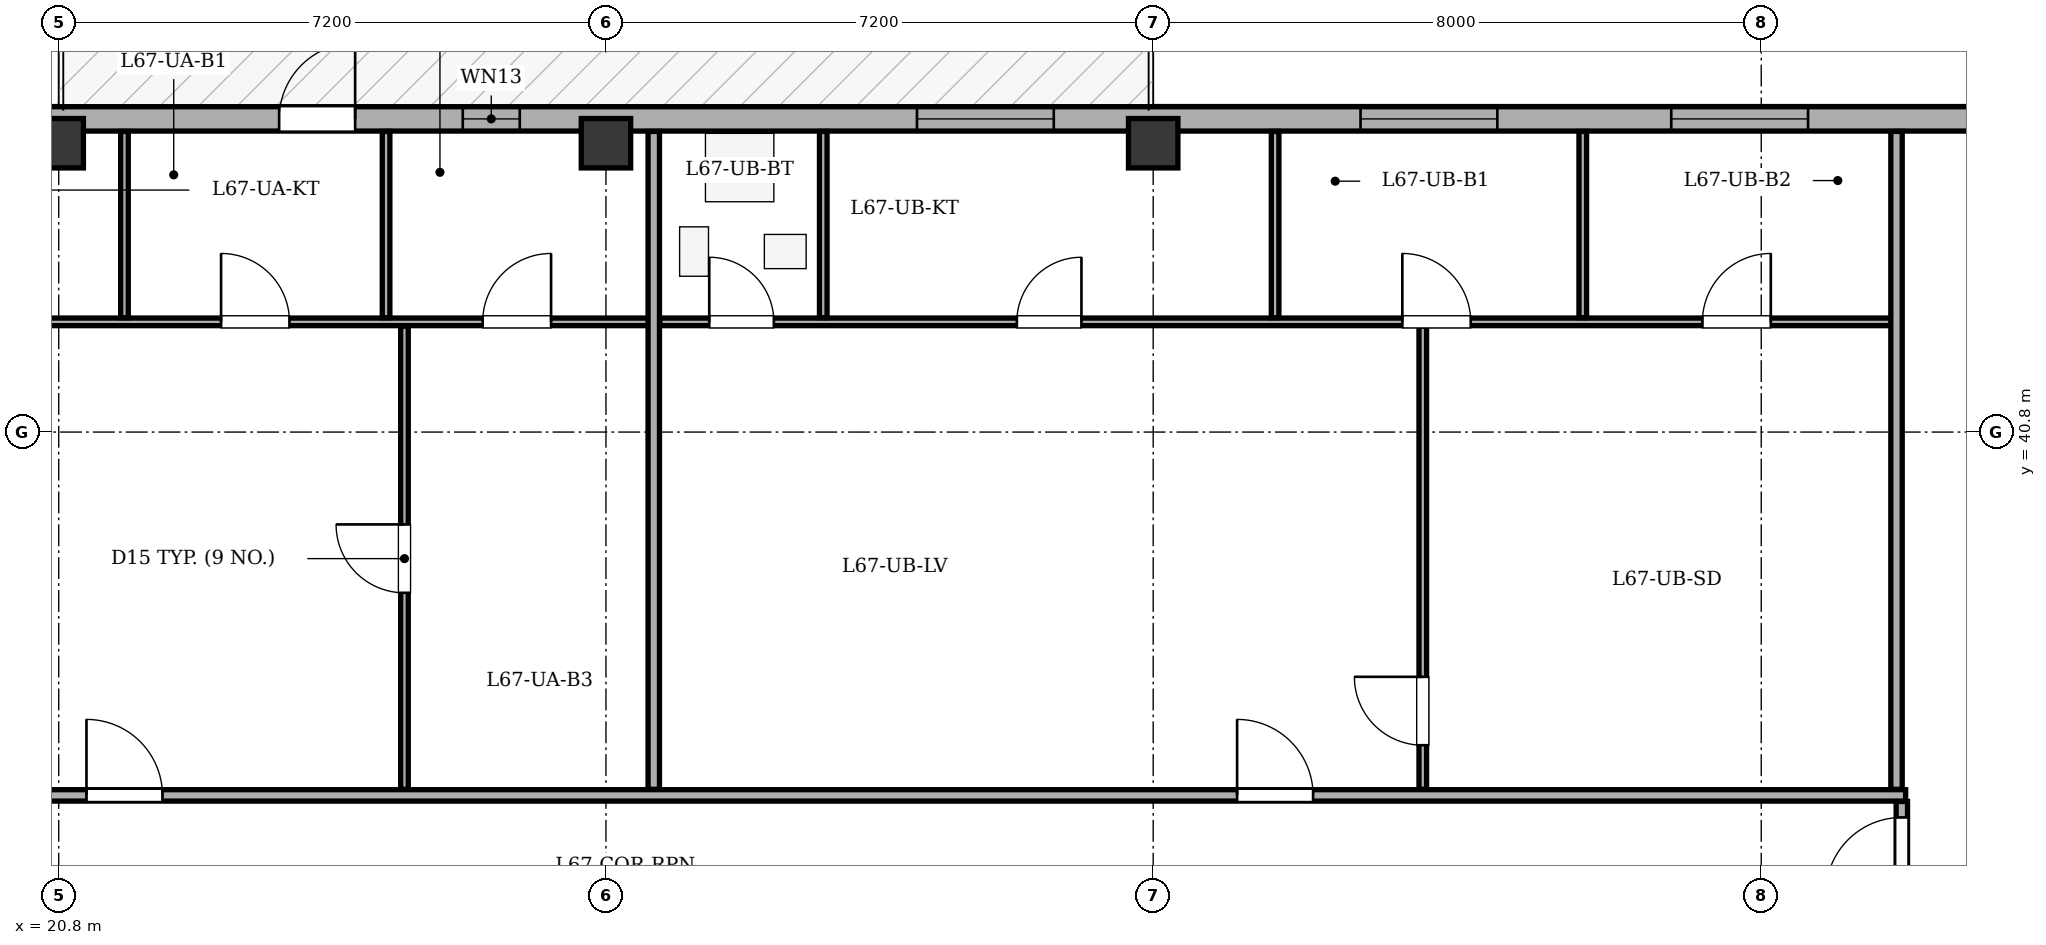
"""IFC4 building model, lengths in metres.
Left out: names, types, materials, properties, quantities, classifications, styles, units other than length and angle.
Written with IfcOpenShell. Run it as: python <this file> out.ifc"""

import sys

from ifc_helpers import new_model, si_unit, direction, frame, frame_2d, origin, origin_2d, place, context, subcontext, project, spatial, rectangle, extrude, element, fill, save


model = new_model("IFC4")
c1 = context("Model", 3, precision=1e-05, world=origin(), true_north=direction((0.0, 1.0)))
c2 = subcontext(c1, "Body", "Model", "MODEL_VIEW")
j1 = project(units=[si_unit("LENGTHUNIT", "METRE"), si_unit("PLANEANGLEUNIT", "RADIAN")], contexts=[c1])
p1 = place(None, origin())
s1 = spatial("IfcSite", under=j1, at=p1, CompositionType="ELEMENT")
p2 = place(p1, origin())
s2 = spatial("IfcBuilding", under=s1, at=p2, CompositionType="ELEMENT")
p3 = place(p2, frame((0.0, 0.0, 255.1)))
s3 = spatial("IfcBuildingStorey", under=s2, at=p3, CompositionType="ELEMENT", Elevation=255.1)
for number, where, z_axis, x_axis in (
    (1, (20.8, 44.6, 0.0), (0.0, 0.0, 1.0), (1.0, 0.0, 0.0)),
    (2, (28.0, 44.6, 0.0), (0.0, 0.0, 1.0), (1.0, 0.0, 0.0)),
    (3, (35.2, 44.6, 0.0), (0.0, 0.0, 1.0), (1.0, 0.0, 0.0)),
):
    element("IfcColumn", number, at=place(p3, frame(where, z_axis=z_axis, x_axis=x_axis)), inside=s3, PredefinedType="COLUMN", context=c2, shape_type="SweptSolid", body=[
        extrude(rectangle(XDim=0.65, YDim=0.65, at=origin_2d()), origin(), (0.0, 0.0, 1.0), 3.4),
    ])
p4 = place(p3, frame((14.7, 44.92, 0.0), z_axis=(0.0, 0.0, 1.0), x_axis=(1.0, 0.0, 0.0)))
e4 = element("IfcWall", 4, at=p4, inside=s3, PredefinedType="STANDARD", context=c2, shape_type="SweptSolid", body=[
    extrude(rectangle(XDim=37.0, YDim=0.32, at=frame_2d((18.5, 0.0))), origin(), (0.0, 0.0, 1.0), 2.725),
])
p5 = place(p4, frame((9.0, 0.0, 0.0)))
e5 = element("IfcOpeningElement", 5, at=p5, cuts=e4, PredefinedType="OPENING", context=c2, shape_type="SweptSolid", body=[
    extrude(rectangle(XDim=1.0, YDim=2.02, at=frame_2d((0.5, 1.01))), frame((0.0, 0.17, 0.0), z_axis=(0.0, -1.0, 0.0), x_axis=(1.0, 0.0, 0.0)), (0.0, 0.0, 1.0), 0.34),
])
p6 = place(p4, frame((3.228, 0.0, 0.75)))
e6 = element("IfcOpeningElement", 6, at=p6, cuts=e4, PredefinedType="OPENING", context=c2, shape_type="SweptSolid", body=[
    extrude(rectangle(XDim=1.8, YDim=1.7, at=frame_2d((0.9, 0.85))), frame((0.0, 0.17, 0.0), z_axis=(0.0, -1.0, 0.0), x_axis=(1.0, 0.0, 0.0)), (0.0, 0.0, 1.0), 0.34),
])
p7 = place(p4, frame((17.392, 0.0, 0.75)))
e7 = element("IfcOpeningElement", 7, at=p7, cuts=e4, PredefinedType="OPENING", context=c2, shape_type="SweptSolid", body=[
    extrude(rectangle(XDim=1.8, YDim=1.7, at=frame_2d((0.9, 0.85))), frame((0.0, 0.17, 0.0), z_axis=(0.0, -1.0, 0.0), x_axis=(1.0, 0.0, 0.0)), (0.0, 0.0, 1.0), 0.34),
])
p8 = place(p4, frame((23.228, 0.0, 0.75)))
e8 = element("IfcOpeningElement", 8, at=p8, cuts=e4, PredefinedType="OPENING", context=c2, shape_type="SweptSolid", body=[
    extrude(rectangle(XDim=1.8, YDim=1.7, at=frame_2d((0.9, 0.85))), frame((0.0, 0.17, 0.0), z_axis=(0.0, -1.0, 0.0), x_axis=(1.0, 0.0, 0.0)), (0.0, 0.0, 1.0), 0.34),
])
p9 = place(p4, frame((27.316, 0.0, 0.75)))
e9 = element("IfcOpeningElement", 9, at=p9, cuts=e4, PredefinedType="OPENING", context=c2, shape_type="SweptSolid", body=[
    extrude(rectangle(XDim=1.8, YDim=1.7, at=frame_2d((0.9, 0.85))), frame((0.0, 0.17, 0.0), z_axis=(0.0, -1.0, 0.0), x_axis=(1.0, 0.0, 0.0)), (0.0, 0.0, 1.0), 0.34),
])
p10 = place(p4, frame((31.315, 0.0, 0.75)))
e10 = element("IfcOpeningElement", 10, at=p10, cuts=e4, PredefinedType="OPENING", context=c2, shape_type="SweptSolid", body=[
    extrude(rectangle(XDim=1.8, YDim=1.7, at=frame_2d((0.9, 0.85))), frame((0.0, 0.17, 0.0), z_axis=(0.0, -1.0, 0.0), x_axis=(1.0, 0.0, 0.0)), (0.0, 0.0, 1.0), 0.34),
])
p11 = place(p4, frame((33.965, 0.0, 0.75)))
e11 = element("IfcOpeningElement", 11, at=p11, cuts=e4, PredefinedType="OPENING", context=c2, shape_type="SweptSolid", body=[
    extrude(rectangle(XDim=1.8, YDim=1.7, at=frame_2d((0.9, 0.85))), frame((0.0, 0.17, 0.0), z_axis=(0.0, -1.0, 0.0), x_axis=(1.0, 0.0, 0.0)), (0.0, 0.0, 1.0), 0.34),
])
p12 = place(p4, frame((11.416, 0.0, 0.75)))
e12 = element("IfcOpeningElement", 12, at=p12, cuts=e4, PredefinedType="OPENING", context=c2, shape_type="SweptSolid", body=[
    extrude(rectangle(XDim=0.75, YDim=1.45, at=frame_2d((0.375, 0.725))), frame((0.0, 0.17, 0.0), z_axis=(0.0, -1.0, 0.0), x_axis=(1.0, 0.0, 0.0)), (0.0, 0.0, 1.0), 0.34),
])
p13 = place(p3, frame((14.58, 36.02, 0.0), z_axis=(0.0, 0.0, 1.0), x_axis=(1.0, 0.0, 0.0)))
e13 = element("IfcWall", 13, at=p13, inside=s3, PredefinedType="PARTITIONING", context=c2, shape_type="SweptSolid", body=[
    extrude(rectangle(XDim=30.52, YDim=0.15, at=frame_2d((15.26, 0.0))), origin(), (0.0, 0.0, 1.0), 3.1),
])
p14 = place(p13, frame((6.585, 0.0, 0.0)))
e14 = element("IfcOpeningElement", 14, at=p14, cuts=e13, PredefinedType="OPENING", context=c2, shape_type="SweptSolid", body=[
    extrude(rectangle(XDim=1.0, YDim=2.1, at=frame_2d((0.5, 1.05))), frame((0.0, 0.085, 0.0), z_axis=(0.0, -1.0, 0.0), x_axis=(1.0, 0.0, 0.0)), (0.0, 0.0, 1.0), 0.17),
])
p15 = place(p13, frame((21.724, 0.0, 0.0)))
e15 = element("IfcOpeningElement", 15, at=p15, cuts=e13, PredefinedType="OPENING", context=c2, shape_type="SweptSolid", body=[
    extrude(rectangle(XDim=1.0, YDim=2.1, at=frame_2d((0.5, 1.05))), frame((0.0, 0.085, 0.0), z_axis=(0.0, -1.0, 0.0), x_axis=(1.0, 0.0, 0.0)), (0.0, 0.0, 1.0), 0.17),
])
p16 = place(p3, frame((14.78, 42.25, 0.0), z_axis=(0.0, 0.0, 1.0), x_axis=(1.0, 0.0, 0.0)))
e16 = element("IfcWall", 16, at=p16, inside=s3, PredefinedType="PARTITIONING", context=c2, shape_type="SweptSolid", body=[
    extrude(rectangle(XDim=13.889, YDim=0.1, at=frame_2d((6.944, 0.0))), origin(), (0.0, 0.0, 1.0), 3.1),
])
p17 = place(p16, frame((0.65, 0.0, 0.0)))
e17 = element("IfcOpeningElement", 17, at=p17, cuts=e16, PredefinedType="OPENING", context=c2, shape_type="SweptSolid", body=[
    extrude(rectangle(XDim=0.85, YDim=2.05, at=frame_2d((0.425, 1.025))), frame((0.0, 0.06, 0.0), z_axis=(0.0, -1.0, 0.0), x_axis=(1.0, 0.0, 0.0)), (0.0, 0.0, 1.0), 0.12),
])
p18 = place(p16, frame((4.093, 0.0, 0.0)))
e18 = element("IfcOpeningElement", 18, at=p18, cuts=e16, PredefinedType="OPENING", context=c2, shape_type="SweptSolid", body=[
    extrude(rectangle(XDim=0.85, YDim=2.05, at=frame_2d((0.425, 1.025))), frame((0.0, 0.06, 0.0), z_axis=(0.0, -1.0, 0.0), x_axis=(1.0, 0.0, 0.0)), (0.0, 0.0, 1.0), 0.12),
])
p19 = place(p16, frame((8.156, 0.0, 0.0)))
e19 = element("IfcOpeningElement", 19, at=p19, cuts=e16, PredefinedType="OPENING", context=c2, shape_type="SweptSolid", body=[
    extrude(rectangle(XDim=0.9, YDim=2.05, at=frame_2d((0.45, 1.025))), frame((0.0, 0.06, 0.0), z_axis=(0.0, -1.0, 0.0), x_axis=(1.0, 0.0, 0.0)), (0.0, 0.0, 1.0), 0.12),
])
p20 = place(p16, frame((11.598, 0.0, 0.0)))
e20 = element("IfcOpeningElement", 20, at=p20, cuts=e16, PredefinedType="OPENING", context=c2, shape_type="SweptSolid", body=[
    extrude(rectangle(XDim=0.9, YDim=2.05, at=frame_2d((0.45, 1.025))), frame((0.0, 0.06, 0.0), z_axis=(0.0, -1.0, 0.0), x_axis=(1.0, 0.0, 0.0)), (0.0, 0.0, 1.0), 0.12),
])
p21 = place(p3, frame((25.349, 36.1, 0.0), z_axis=(0.0, 0.0, 1.0), x_axis=(0.0, 1.0, 0.0)))
e21 = element("IfcWall", 21, at=p21, inside=s3, PredefinedType="PARTITIONING", context=c2, shape_type="SweptSolid", body=[
    extrude(rectangle(XDim=6.095, YDim=0.1, at=frame_2d((3.047, 0.0))), origin(), (0.0, 0.0, 1.0), 3.1),
])
p22 = place(p21, frame((2.585, 0.0, 0.0)))
e22 = element("IfcOpeningElement", 22, at=p22, cuts=e21, PredefinedType="OPENING", context=c2, shape_type="SweptSolid", body=[
    extrude(rectangle(XDim=0.9, YDim=2.05, at=frame_2d((0.45, 1.025))), frame((0.0, 0.06, 0.0), z_axis=(0.0, -1.0, 0.0), x_axis=(1.0, 0.0, 0.0)), (0.0, 0.0, 1.0), 0.12),
])
for number, where, z_axis, x_axis in (
    (23, (21.665, 42.305, 0.0), (0.0, 0.0, 1.0), (0.0, 1.0, 0.0)),
    (24, (25.107, 42.305, 0.0), (0.0, 0.0, 1.0), (0.0, 1.0, 0.0)),
):
    element("IfcWall", number, at=place(p3, frame(where, z_axis=z_axis, x_axis=x_axis)), inside=s3, PredefinedType="PARTITIONING", context=c2, shape_type="SweptSolid", body=[
        extrude(rectangle(XDim=2.45, YDim=0.1, at=frame_2d((1.225, 0.0))), origin(), (0.0, 0.0, 1.0), 3.1),
    ])
p23 = place(p3, frame((28.629, 36.1, 0.0), z_axis=(0.0, 0.0, 1.0), x_axis=(0.0, 1.0, 0.0)))
e25 = element("IfcWall", 25, at=p23, inside=s3, PredefinedType="PARTITIONING", context=c2, shape_type="SweptSolid", body=[
    extrude(rectangle(XDim=8.655, YDim=0.15, at=frame_2d((4.327, 0.0))), origin(), (0.0, 0.0, 1.0), 3.1),
])
p24 = place(p3, frame((28.709, 42.25, 0.0), z_axis=(0.0, 0.0, 1.0), x_axis=(1.0, 0.0, 0.0)))
e26 = element("IfcWall", 26, at=p24, inside=s3, PredefinedType="PARTITIONING", context=c2, shape_type="SweptSolid", body=[
    extrude(rectangle(XDim=16.311, YDim=0.1, at=frame_2d((8.156, 0.0))), origin(), (0.0, 0.0, 1.0), 3.1),
])
p25 = place(p24, frame((0.65, 0.0, 0.0)))
e27 = element("IfcOpeningElement", 27, at=p25, cuts=e26, PredefinedType="OPENING", context=c2, shape_type="SweptSolid", body=[
    extrude(rectangle(XDim=0.85, YDim=2.05, at=frame_2d((0.425, 1.025))), frame((0.0, 0.06, 0.0), z_axis=(0.0, -1.0, 0.0), x_axis=(1.0, 0.0, 0.0)), (0.0, 0.0, 1.0), 0.12),
])
p26 = place(p24, frame((4.697, 0.0, 0.0)))
e28 = element("IfcOpeningElement", 28, at=p26, cuts=e26, PredefinedType="OPENING", context=c2, shape_type="SweptSolid", body=[
    extrude(rectangle(XDim=0.85, YDim=2.05, at=frame_2d((0.425, 1.025))), frame((0.0, 0.06, 0.0), z_axis=(0.0, -1.0, 0.0), x_axis=(1.0, 0.0, 0.0)), (0.0, 0.0, 1.0), 0.12),
])
p27 = place(p24, frame((9.769, 0.0, 0.0)))
e29 = element("IfcOpeningElement", 29, at=p27, cuts=e26, PredefinedType="OPENING", context=c2, shape_type="SweptSolid", body=[
    extrude(rectangle(XDim=0.9, YDim=2.05, at=frame_2d((0.45, 1.025))), frame((0.0, 0.06, 0.0), z_axis=(0.0, -1.0, 0.0), x_axis=(1.0, 0.0, 0.0)), (0.0, 0.0, 1.0), 0.12),
])
p28 = place(p24, frame((13.717, 0.0, 0.0)))
e30 = element("IfcOpeningElement", 30, at=p28, cuts=e26, PredefinedType="OPENING", context=c2, shape_type="SweptSolid", body=[
    extrude(rectangle(XDim=0.9, YDim=2.05, at=frame_2d((0.45, 1.025))), frame((0.0, 0.06, 0.0), z_axis=(0.0, -1.0, 0.0), x_axis=(1.0, 0.0, 0.0)), (0.0, 0.0, 1.0), 0.12),
])
p29 = place(p3, frame((38.747, 36.1, 0.0), z_axis=(0.0, 0.0, 1.0), x_axis=(0.0, 1.0, 0.0)))
e31 = element("IfcWall", 31, at=p29, inside=s3, PredefinedType="PARTITIONING", context=c2, shape_type="SweptSolid", body=[
    extrude(rectangle(XDim=6.095, YDim=0.1, at=frame_2d((3.047, 0.0))), origin(), (0.0, 0.0, 1.0), 3.1),
])
p30 = place(p29, frame((0.58, 0.0, 0.0)))
e32 = element("IfcOpeningElement", 32, at=p30, cuts=e31, PredefinedType="OPENING", context=c2, shape_type="SweptSolid", body=[
    extrude(rectangle(XDim=0.9, YDim=2.05, at=frame_2d((0.45, 1.025))), frame((0.0, 0.06, 0.0), z_axis=(0.0, -1.0, 0.0), x_axis=(1.0, 0.0, 0.0)), (0.0, 0.0, 1.0), 0.12),
])
for number, where, z_axis, x_axis in (
    (33, (30.859, 42.305, 0.0), (0.0, 0.0, 1.0), (0.0, 1.0, 0.0)),
    (34, (36.804, 42.305, 0.0), (0.0, 0.0, 1.0), (0.0, 1.0, 0.0)),
    (35, (40.852, 42.305, 0.0), (0.0, 0.0, 1.0), (0.0, 1.0, 0.0)),
):
    element("IfcWall", number, at=place(p3, frame(where, z_axis=z_axis, x_axis=x_axis)), inside=s3, PredefinedType="PARTITIONING", context=c2, shape_type="SweptSolid", body=[
        extrude(rectangle(XDim=2.45, YDim=0.1, at=frame_2d((1.225, 0.0))), origin(), (0.0, 0.0, 1.0), 3.1),
    ])
p31 = place(p3, frame((44.98, 36.1, 0.0), z_axis=(0.0, 0.0, 1.0), x_axis=(0.0, 1.0, 0.0)))
e36 = element("IfcWall", 36, at=p31, inside=s3, PredefinedType="PARTITIONING", context=c2, shape_type="SweptSolid", body=[
    extrude(rectangle(XDim=8.655, YDim=0.15, at=frame_2d((4.327, 0.0))), origin(), (0.0, 0.0, 1.0), 2.725),
])
p32 = place(p3, frame((45.05, 34.15, 0.0), z_axis=(0.0, 0.0, 1.0), x_axis=(0.0, 1.0, 0.0)))
e37 = element("IfcWall", 37, at=p32, inside=s3, PredefinedType="PARTITIONING", context=c2, shape_type="SweptSolid", body=[
    extrude(rectangle(XDim=1.79, YDim=0.15, at=frame_2d((0.895, 0.0))), origin(), (0.0, 0.0, 1.0), 2.725),
])
p33 = place(p32, frame((0.58, 0.0, 0.0)))
e38 = element("IfcOpeningElement", 38, at=p33, cuts=e37, PredefinedType="OPENING", context=c2, shape_type="SweptSolid", body=[
    extrude(rectangle(XDim=1.0, YDim=2.1, at=frame_2d((0.5, 1.05))), frame((0.0, 0.085, 0.0), z_axis=(0.0, -1.0, 0.0), x_axis=(1.0, 0.0, 0.0)), (0.0, 0.0, 1.0), 0.17),
])
p34 = place(p5, origin())
e39 = element("IfcDoor", 39, at=p34, inside=s3, OperationType="SINGLE_SWING_RIGHT", PredefinedType="DOOR", context=c2, shape_type="SweptSolid", body=[
    extrude(rectangle(XDim=1.0, YDim=2.02, at=frame_2d((0.5, 1.01))), frame((0.0, 0.025, 0.0), z_axis=(0.0, -1.0, 0.0), x_axis=(1.0, 0.0, 0.0)), (0.0, 0.0, 1.0), 0.05),
])
fill(e5, e39)
p35 = place(p7, origin())
e40 = element("IfcWindow", 40, at=p35, inside=s3, PartitioningType="SINGLE_PANEL", PredefinedType="WINDOW", context=c2, shape_type="SweptSolid", body=[
    extrude(rectangle(XDim=1.8, YDim=1.7, at=frame_2d((0.9, 0.85))), frame((0.0, -0.01, 0.0), z_axis=(0.0, -1.0, 0.0), x_axis=(1.0, 0.0, 0.0)), (0.0, 0.0, 1.0), 0.06),
])
fill(e7, e40)
p36 = place(p8, origin())
e41 = element("IfcWindow", 41, at=p36, inside=s3, PartitioningType="SINGLE_PANEL", PredefinedType="WINDOW", context=c2, shape_type="SweptSolid", body=[
    extrude(rectangle(XDim=1.8, YDim=1.7, at=frame_2d((0.9, 0.85))), frame((0.0, -0.01, 0.0), z_axis=(0.0, -1.0, 0.0), x_axis=(1.0, 0.0, 0.0)), (0.0, 0.0, 1.0), 0.06),
])
fill(e8, e41)
p37 = place(p9, origin())
e42 = element("IfcWindow", 42, at=p37, inside=s3, PartitioningType="SINGLE_PANEL", PredefinedType="WINDOW", context=c2, shape_type="SweptSolid", body=[
    extrude(rectangle(XDim=1.8, YDim=1.7, at=frame_2d((0.9, 0.85))), frame((0.0, -0.01, 0.0), z_axis=(0.0, -1.0, 0.0), x_axis=(1.0, 0.0, 0.0)), (0.0, 0.0, 1.0), 0.06),
])
fill(e9, e42)
p38 = place(p12, origin())
e43 = element("IfcWindow", 43, at=p38, inside=s3, PartitioningType="SINGLE_PANEL", PredefinedType="WINDOW", context=c2, shape_type="SweptSolid", body=[
    extrude(rectangle(XDim=0.75, YDim=1.45, at=frame_2d((0.375, 0.725))), frame((0.0, -0.01, 0.0), z_axis=(0.0, -1.0, 0.0), x_axis=(1.0, 0.0, 0.0)), (0.0, 0.0, 1.0), 0.06),
])
fill(e12, e43)
p39 = place(p14, origin())
e44 = element("IfcDoor", 44, at=p39, inside=s3, OperationType="SINGLE_SWING_LEFT", PredefinedType="DOOR", context=c2, shape_type="SweptSolid", body=[
    extrude(rectangle(XDim=1.0, YDim=2.1, at=frame_2d((0.5, 1.05))), frame((0.0, 0.025, 0.0), z_axis=(0.0, -1.0, 0.0), x_axis=(1.0, 0.0, 0.0)), (0.0, 0.0, 1.0), 0.05),
])
fill(e14, e44)
p40 = place(p15, origin())
e45 = element("IfcDoor", 45, at=p40, inside=s3, OperationType="SINGLE_SWING_LEFT", PredefinedType="DOOR", context=c2, shape_type="SweptSolid", body=[
    extrude(rectangle(XDim=1.0, YDim=2.1, at=frame_2d((0.5, 1.05))), frame((0.0, 0.025, 0.0), z_axis=(0.0, -1.0, 0.0), x_axis=(1.0, 0.0, 0.0)), (0.0, 0.0, 1.0), 0.05),
])
fill(e15, e45)
p41 = place(p22, origin())
e46 = element("IfcDoor", 46, at=p41, inside=s3, OperationType="SINGLE_SWING_RIGHT", PredefinedType="DOOR", context=c2, shape_type="SweptSolid", body=[
    extrude(rectangle(XDim=0.9, YDim=2.05, at=frame_2d((0.45, 1.025))), frame((0.0, 0.025, 0.0), z_axis=(0.0, -1.0, 0.0), x_axis=(1.0, 0.0, 0.0)), (0.0, 0.0, 1.0), 0.05),
])
fill(e22, e46)
p42 = place(p19, origin())
e47 = element("IfcDoor", 47, at=p42, inside=s3, OperationType="SINGLE_SWING_LEFT", PredefinedType="DOOR", context=c2, shape_type="SweptSolid", body=[
    extrude(rectangle(XDim=0.9, YDim=2.05, at=frame_2d((0.45, 1.025))), frame((0.0, 0.025, 0.0), z_axis=(0.0, -1.0, 0.0), x_axis=(1.0, 0.0, 0.0)), (0.0, 0.0, 1.0), 0.05),
])
fill(e19, e47)
p43 = place(p20, origin())
e48 = element("IfcDoor", 48, at=p43, inside=s3, OperationType="SINGLE_SWING_RIGHT", PredefinedType="DOOR", context=c2, shape_type="SweptSolid", body=[
    extrude(rectangle(XDim=0.9, YDim=2.05, at=frame_2d((0.45, 1.025))), frame((0.0, 0.025, 0.0), z_axis=(0.0, -1.0, 0.0), x_axis=(1.0, 0.0, 0.0)), (0.0, 0.0, 1.0), 0.05),
])
fill(e20, e48)
p44 = place(p30, origin())
e49 = element("IfcDoor", 49, at=p44, inside=s3, OperationType="SINGLE_SWING_RIGHT", PredefinedType="DOOR", context=c2, shape_type="SweptSolid", body=[
    extrude(rectangle(XDim=0.9, YDim=2.05, at=frame_2d((0.45, 1.025))), frame((0.0, 0.025, 0.0), z_axis=(0.0, -1.0, 0.0), x_axis=(1.0, 0.0, 0.0)), (0.0, 0.0, 1.0), 0.05),
])
fill(e32, e49)
p45 = place(p25, origin())
e50 = element("IfcDoor", 50, at=p45, inside=s3, OperationType="SINGLE_SWING_LEFT", PredefinedType="DOOR", context=c2, shape_type="SweptSolid", body=[
    extrude(rectangle(XDim=0.85, YDim=2.05, at=frame_2d((0.425, 1.025))), frame((0.0, 0.025, 0.0), z_axis=(0.0, -1.0, 0.0), x_axis=(1.0, 0.0, 0.0)), (0.0, 0.0, 1.0), 0.05),
])
fill(e27, e50)
p46 = place(p26, origin())
e51 = element("IfcDoor", 51, at=p46, inside=s3, OperationType="SINGLE_SWING_RIGHT", PredefinedType="DOOR", context=c2, shape_type="SweptSolid", body=[
    extrude(rectangle(XDim=0.85, YDim=2.05, at=frame_2d((0.425, 1.025))), frame((0.0, 0.025, 0.0), z_axis=(0.0, -1.0, 0.0), x_axis=(1.0, 0.0, 0.0)), (0.0, 0.0, 1.0), 0.05),
])
fill(e28, e51)
p47 = place(p27, origin())
e52 = element("IfcDoor", 52, at=p47, inside=s3, OperationType="SINGLE_SWING_LEFT", PredefinedType="DOOR", context=c2, shape_type="SweptSolid", body=[
    extrude(rectangle(XDim=0.9, YDim=2.05, at=frame_2d((0.45, 1.025))), frame((0.0, 0.025, 0.0), z_axis=(0.0, -1.0, 0.0), x_axis=(1.0, 0.0, 0.0)), (0.0, 0.0, 1.0), 0.05),
])
fill(e29, e52)
p48 = place(p28, origin())
e53 = element("IfcDoor", 53, at=p48, inside=s3, OperationType="SINGLE_SWING_RIGHT", PredefinedType="DOOR", context=c2, shape_type="SweptSolid", body=[
    extrude(rectangle(XDim=0.9, YDim=2.05, at=frame_2d((0.45, 1.025))), frame((0.0, 0.025, 0.0), z_axis=(0.0, -1.0, 0.0), x_axis=(1.0, 0.0, 0.0)), (0.0, 0.0, 1.0), 0.05),
])
fill(e30, e53)
p49 = place(p33, origin())
e54 = element("IfcDoor", 54, at=p49, inside=s3, OperationType="SINGLE_SWING_LEFT", PredefinedType="DOOR", context=c2, shape_type="SweptSolid", body=[
    extrude(rectangle(XDim=1.0, YDim=2.1, at=frame_2d((0.5, 1.05))), frame((0.0, 0.025, 0.0), z_axis=(0.0, -1.0, 0.0), x_axis=(1.0, 0.0, 0.0)), (0.0, 0.0, 1.0), 0.05),
])
fill(e38, e54)
save(model, sys.argv[1])
